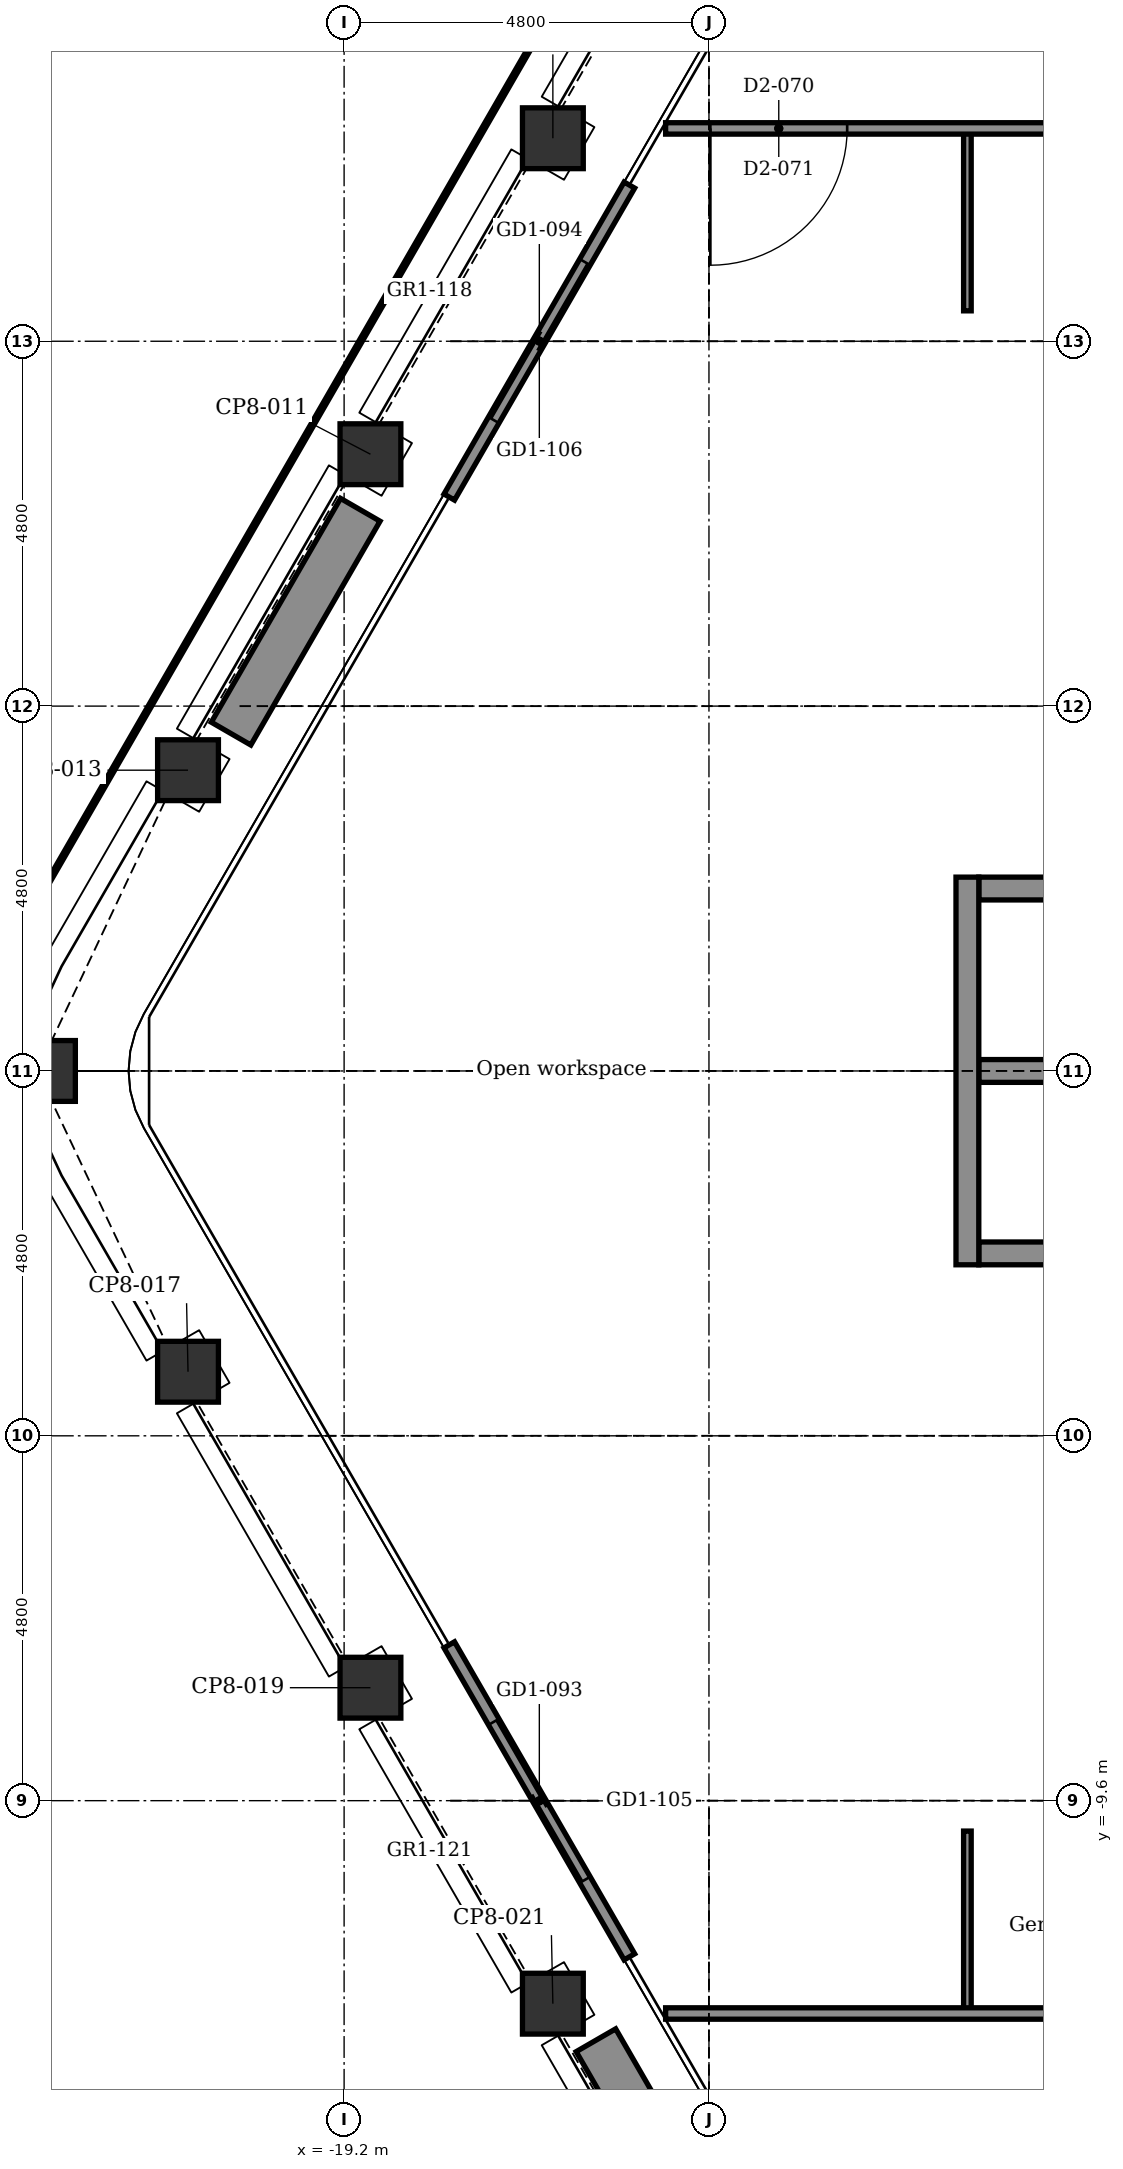
"""IFC4 building model, lengths in metres.
Left out: names, types, materials, properties, quantities, classifications, styles, units other than length and angle.
Written with IfcOpenShell. Run it as: python <this file> out.ifc"""

import sys

from ifc_helpers import new_model, si_unit, direction, frame, frame_2d, origin, origin_2d, place, context, subcontext, project, spatial, rectangle, extrude, element, fill, save


model = new_model("IFC4")
c1 = context("Model", 3, precision=1e-05, world=origin(), true_north=direction((0.0, 1.0)))
c2 = subcontext(c1, "Body", "Model", "MODEL_VIEW")
j1 = project(units=[si_unit("LENGTHUNIT", "METRE"), si_unit("PLANEANGLEUNIT", "RADIAN")], contexts=[c1])
p1 = place(None, origin())
s1 = spatial("IfcSite", under=j1, at=p1, CompositionType="ELEMENT")
p2 = place(p1, origin())
s2 = spatial("IfcBuilding", under=s1, at=p2, CompositionType="ELEMENT")
p3 = place(p2, frame((0.0, 0.0, 242.3)))
s3 = spatial("IfcBuildingStorey", under=s2, at=p3, CompositionType="ELEMENT", Elevation=242.3)
for number, where, z_axis, x_axis in (
    (1, (-16.454, -12.271, -0.15), (0.0, 0.0, 1.0), (0.866, 0.5, 0.0)),
    (2, (-18.854, -8.114, -0.15), (0.0, 0.0, 1.0), (0.866, 0.5, 0.0)),
    (3, (-21.254, -3.957, -0.15), (0.0, 0.0, 1.0), (0.866, 0.5, 0.0)),
    (4, (-23.136, 0.0, -0.15), (0.0, 0.0, 1.0), (1.0, 0.0, 0.0)),
    (5, (-21.254, 3.957, -0.15), (0.0, 0.0, 1.0), (0.5, 0.866, 0.0)),
    (6, (-18.854, 8.114, -0.15), (0.0, 0.0, 1.0), (0.5, 0.866, 0.0)),
    (7, (-16.454, 12.271, -0.15), (0.0, 0.0, 1.0), (0.5, 0.866, 0.0)),
):
    element("IfcColumn", number, at=place(p3, frame(where, z_axis=z_axis, x_axis=x_axis)), inside=s3, PredefinedType="COLUMN", context=c2, shape_type="SweptSolid", body=[
        extrude(rectangle(XDim=0.8, YDim=0.8, at=origin_2d()), origin(), (0.0, 0.0, 1.0), 3.9),
    ])
p4 = place(p3, frame((-10.85, -2.4, -0.15), z_axis=(0.0, 0.0, 1.0), x_axis=(1.0, 0.0, 0.0)))
e8 = element("IfcWall", 8, at=p4, inside=s3, PredefinedType="STANDARD", context=c2, shape_type="SweptSolid", body=[
    extrude(rectangle(XDim=1.1, YDim=0.3, at=frame_2d((0.55, 0.0))), origin(), (0.0, 0.0, 1.0), 3.9),
])
p5 = place(p3, frame((-10.85, 0.0, -0.15), z_axis=(0.0, 0.0, 1.0), x_axis=(1.0, 0.0, 0.0)))
e9 = element("IfcWall", 9, at=p5, inside=s3, PredefinedType="STANDARD", context=c2, shape_type="SweptSolid", body=[
    extrude(rectangle(XDim=3.3, YDim=0.3, at=frame_2d((1.65, 0.0))), origin(), (0.0, 0.0, 1.0), 3.9),
])
p6 = place(p3, frame((-10.85, 2.4, -0.15), z_axis=(0.0, 0.0, 1.0), x_axis=(1.0, 0.0, 0.0)))
e10 = element("IfcWall", 10, at=p6, inside=s3, PredefinedType="STANDARD", context=c2, shape_type="SweptSolid", body=[
    extrude(rectangle(XDim=1.1, YDim=0.3, at=frame_2d((0.55, 0.0))), origin(), (0.0, 0.0, 1.0), 3.9),
])
p7 = place(p3, frame((-11.0, -2.55, -0.15), z_axis=(0.0, 0.0, 1.0), x_axis=(0.0, 1.0, 0.0)))
e11 = element("IfcWall", 11, at=p7, inside=s3, PredefinedType="STANDARD", context=c2, shape_type="SweptSolid", body=[
    extrude(rectangle(XDim=5.1, YDim=0.3, at=frame_2d((2.55, 0.0))), origin(), (0.0, 0.0, 1.0), 3.9),
])
p8 = place(p3, frame((-15.447, -11.655, 0.0), z_axis=(0.0, 0.0, 1.0), x_axis=(-0.499978080042, 0.866038058908, 0.0)))
e12 = element("IfcWall", 12, at=p8, inside=s3, PredefinedType="PARTITIONING", context=c2, shape_type="SweptSolid", body=[
    extrude(rectangle(XDim=4.74, YDim=0.16, at=frame_2d((2.37, 0.0))), origin(), (0.0, 0.0, 1.0), 3.75),
])
p9 = place(p8, frame((1.17, 0.0, 0.0)))
e13 = element("IfcOpeningElement", 13, at=p9, cuts=e12, PredefinedType="OPENING", context=c2, shape_type="SweptSolid", body=[
    extrude(rectangle(XDim=2.4, YDim=2.4, at=frame_2d((1.2, 1.2))), frame((0.0, 0.09, 0.0), z_axis=(0.0, -1.0, 0.0), x_axis=(1.0, 0.0, 0.0)), (0.0, 0.0, 1.0), 0.18),
])
p10 = place(p3, frame((-17.817, 7.55, 0.0), z_axis=(0.0, 0.0, 1.0), x_axis=(0.499978080042, 0.866038058908, 0.0)))
e14 = element("IfcWall", 14, at=p10, inside=s3, PredefinedType="PARTITIONING", context=c2, shape_type="SweptSolid", body=[
    extrude(rectangle(XDim=4.74, YDim=0.16, at=frame_2d((2.37, 0.0))), origin(), (0.0, 0.0, 1.0), 3.75),
])
p11 = place(p10, frame((1.17, 0.0, 0.0)))
e15 = element("IfcOpeningElement", 15, at=p11, cuts=e14, PredefinedType="OPENING", context=c2, shape_type="SweptSolid", body=[
    extrude(rectangle(XDim=2.4, YDim=2.4, at=frame_2d((1.2, 1.2))), frame((0.0, 0.09, 0.0), z_axis=(0.0, -1.0, 0.0), x_axis=(1.0, 0.0, 0.0)), (0.0, 0.0, 1.0), 0.18),
])
p12 = place(p3, frame((-14.187, -15.697, 0.0), z_axis=(0.0, 0.0, 1.0), x_axis=(-0.499977295307, 0.866038511948, 0.0)))
e16 = element("IfcWall", 16, at=p12, inside=s3, PredefinedType="USERDEFINED", context=c2, shape_type="SweptSolid", body=[
    extrude(rectangle(XDim=3.4, YDim=0.6, at=frame_2d((1.7, 0.0))), origin(), (0.0, 0.0, 1.0), 0.7),
])
p13 = place(p3, frame((-20.687, 4.438, 0.0), z_axis=(0.0, 0.0, 1.0), x_axis=(0.500008388397, 0.866020560687, 0.0)))
e17 = element("IfcWall", 17, at=p13, inside=s3, PredefinedType="USERDEFINED", context=c2, shape_type="SweptSolid", body=[
    extrude(rectangle(XDim=3.4, YDim=0.6, at=frame_2d((1.7, 0.0))), origin(), (0.0, 0.0, 1.0), 0.7),
])
for number, where, z_axis, x_axis in (
    (18, (-11.0, -12.4, 0.0), (0.0, 0.0, 1.0), (0.0, 1.0, 0.0)),
    (19, (-11.0, 10.0, 0.0), (0.0, 0.0, 1.0), (0.0, 1.0, 0.0)),
):
    element("IfcWall", number, at=place(p3, frame(where, z_axis=z_axis, x_axis=x_axis)), inside=s3, PredefinedType="PARTITIONING", context=c2, shape_type="SweptSolid", body=[
        extrude(rectangle(XDim=2.4, YDim=0.1, at=frame_2d((1.2, 0.0))), origin(), (0.0, 0.0, 1.0), 3.75),
    ])
p14 = place(p3, frame((-14.97, -12.4, 0.0), z_axis=(0.0, 0.0, 1.0), x_axis=(1.0, 0.0, 0.0)))
e20 = element("IfcWall", 20, at=p14, inside=s3, PredefinedType="PARTITIONING", context=c2, shape_type="SweptSolid", body=[
    extrude(rectangle(XDim=10.17, YDim=0.15, at=frame_2d((5.085, 0.0))), origin(), (0.0, 0.0, 1.0), 3.75),
])
p15 = place(p14, frame((6.62, 0.0, 0.0)))
e21 = element("IfcOpeningElement", 21, at=p15, cuts=e20, PredefinedType="OPENING", context=c2, shape_type="SweptSolid", body=[
    extrude(rectangle(XDim=0.9, YDim=2.1, at=frame_2d((0.45, 1.05))), frame((0.0, 0.085, 0.0), z_axis=(0.0, -1.0, 0.0), x_axis=(1.0, 0.0, 0.0)), (0.0, 0.0, 1.0), 0.17),
])
p16 = place(p3, frame((-14.97, 12.4, 0.0), z_axis=(0.0, 0.0, 1.0), x_axis=(1.0, 0.0, 0.0)))
e22 = element("IfcWall", 22, at=p16, inside=s3, PredefinedType="PARTITIONING", context=c2, shape_type="SweptSolid", body=[
    extrude(rectangle(XDim=9.57, YDim=0.15, at=frame_2d((4.785, 0.0))), origin(), (0.0, 0.0, 1.0), 3.75),
])
p17 = place(p16, frame((5.715, 0.0, 0.0)))
e23 = element("IfcOpeningElement", 23, at=p17, cuts=e22, PredefinedType="OPENING", context=c2, shape_type="SweptSolid", body=[
    extrude(rectangle(XDim=1.0, YDim=2.1, at=frame_2d((0.5, 1.05))), frame((0.0, 0.085, 0.0), z_axis=(0.0, -1.0, 0.0), x_axis=(1.0, 0.0, 0.0)), (0.0, 0.0, 1.0), 0.17),
])
p18 = place(p16, frame((0.589, 0.0, 0.0)))
e24 = element("IfcOpeningElement", 24, at=p18, cuts=e22, PredefinedType="OPENING", context=c2, shape_type="SweptSolid", body=[
    extrude(rectangle(XDim=1.8, YDim=2.1, at=frame_2d((0.9, 1.05))), frame((0.0, 0.085, 0.0), z_axis=(0.0, -1.0, 0.0), x_axis=(1.0, 0.0, 0.0)), (0.0, 0.0, 1.0), 0.17),
])
p19 = place(p9, origin())
e25 = element("IfcDoor", 25, at=p19, inside=s3, OperationType="DOUBLE_DOOR_SLIDING", PredefinedType="DOOR", context=c2, shape_type="SweptSolid", body=[
    extrude(rectangle(XDim=2.4, YDim=2.4, at=frame_2d((1.2, 1.2))), frame((0.0, 0.025, 0.0), z_axis=(0.0, -1.0, 0.0), x_axis=(1.0, 0.0, 0.0)), (0.0, 0.0, 1.0), 0.05),
])
fill(e13, e25)
p20 = place(p11, origin())
e26 = element("IfcDoor", 26, at=p20, inside=s3, OperationType="DOUBLE_DOOR_SLIDING", PredefinedType="DOOR", context=c2, shape_type="SweptSolid", body=[
    extrude(rectangle(XDim=2.4, YDim=2.4, at=frame_2d((1.2, 1.2))), frame((0.0, 0.025, 0.0), z_axis=(0.0, -1.0, 0.0), x_axis=(1.0, 0.0, 0.0)), (0.0, 0.0, 1.0), 0.05),
])
fill(e15, e26)
p21 = place(p18, frame((1.8, 0.0, 0.0), z_axis=(0.0, 0.0, 1.0), x_axis=(-1.0, 0.0, 0.0)))
e27 = element("IfcDoor", 27, at=p21, inside=s3, OperationType="SINGLE_SWING_LEFT", PredefinedType="DOOR", context=c2, shape_type="SweptSolid", body=[
    extrude(rectangle(XDim=1.8, YDim=2.1, at=frame_2d((0.9, 1.05))), frame((0.0, 0.025, 0.0), z_axis=(0.0, -1.0, 0.0), x_axis=(1.0, 0.0, 0.0)), (0.0, 0.0, 1.0), 0.05),
])
fill(e24, e27)
save(model, sys.argv[1])
